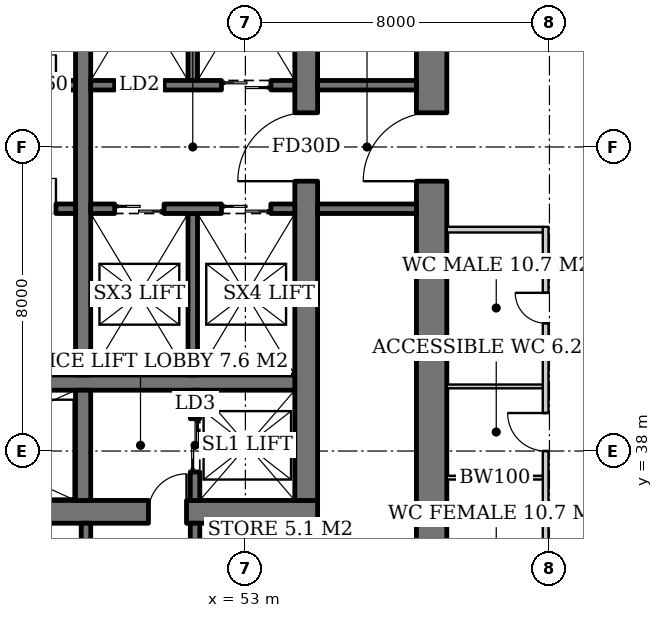
"""IFC4 building model, lengths in metres.
Left out: names, types, materials, properties, quantities, classifications, styles, units other than length and angle.
Written with IfcOpenShell. Run it as: python <this file> out.ifc"""

import sys

from ifc_helpers import new_model, si_unit, direction, frame, frame_2d, origin, place, context, subcontext, project, spatial, rectangle, extrude, element, fill, save


model = new_model("IFC4")
c1 = context("Model", 3, precision=1e-05, world=origin(), true_north=direction((0.0, 1.0)))
c2 = subcontext(c1, "Body", "Model", "MODEL_VIEW")
j1 = project(units=[si_unit("LENGTHUNIT", "METRE"), si_unit("PLANEANGLEUNIT", "RADIAN")], contexts=[c1])
p1 = place(None, origin())
s1 = spatial("IfcSite", under=j1, at=p1, CompositionType="ELEMENT")
p2 = place(p1, origin())
s2 = spatial("IfcBuilding", under=s1, at=p2, CompositionType="ELEMENT")
p3 = place(p2, origin())
s3 = spatial("IfcBuildingStorey", under=s2, at=p3, CompositionType="ELEMENT", Elevation=0.0)
p4 = place(p3, frame((35.1, 36.4, 0.0), z_axis=(0.0, 0.0, 1.0), x_axis=(1.0, 0.0, 0.0)))
e1 = element("IfcWall", 1, at=p4, inside=s3, PredefinedType="SHEAR", context=c2, shape_type="SweptSolid", body=[
    extrude(rectangle(XDim=19.8, YDim=0.6, at=frame_2d((9.9, 0.0))), origin(), (0.0, 0.0, 1.0), 6.0),
])
p5 = place(p4, frame((3.9, 0.0, 0.0)))
e2 = element("IfcOpeningElement", 2, at=p5, cuts=e1, PredefinedType="OPENING", context=c2, shape_type="SweptSolid", body=[
    extrude(rectangle(XDim=1.0, YDim=2.1, at=frame_2d((0.5, 1.05))), frame((0.0, 0.31, 0.0), z_axis=(0.0, -1.0, 0.0), x_axis=(1.0, 0.0, 0.0)), (0.0, 0.0, 1.0), 0.62),
])
p6 = place(p4, frame((15.35, 0.0, 0.0)))
e3 = element("IfcOpeningElement", 3, at=p6, cuts=e1, PredefinedType="OPENING", context=c2, shape_type="SweptSolid", body=[
    extrude(rectangle(XDim=1.0, YDim=2.1, at=frame_2d((0.5, 1.05))), frame((0.0, 0.31, 0.0), z_axis=(0.0, -1.0, 0.0), x_axis=(1.0, 0.0, 0.0)), (0.0, 0.0, 1.0), 0.62),
])
p7 = place(p3, frame((54.6, 36.7, 0.0), z_axis=(0.0, 0.0, 1.0), x_axis=(0.0, 1.0, 0.0)))
e4 = element("IfcWall", 4, at=p7, inside=s3, PredefinedType="SHEAR", context=c2, shape_type="SweptSolid", body=[
    extrude(rectangle(XDim=18.6, YDim=0.6, at=frame_2d((9.3, 0.0))), origin(), (0.0, 0.0, 1.0), 6.0),
])
p8 = place(p7, frame((8.4, 0.0, 0.0)))
e5 = element("IfcOpeningElement", 5, at=p8, cuts=e4, PredefinedType="OPENING", context=c2, shape_type="SweptSolid", body=[
    extrude(rectangle(XDim=1.8, YDim=2.4, at=frame_2d((0.9, 1.2))), frame((0.0, 0.31, 0.0), z_axis=(0.0, -1.0, 0.0), x_axis=(1.0, 0.0, 0.0)), (0.0, 0.0, 1.0), 0.62),
])
p9 = place(p3, frame((57.9, 33.5, 0.0), z_axis=(0.0, 0.0, 1.0), x_axis=(0.0, 1.0, 0.0)))
e6 = element("IfcWall", 6, at=p9, inside=s3, PredefinedType="SHEAR", context=c2, shape_type="SweptSolid", body=[
    extrude(rectangle(XDim=25.0, YDim=0.8, at=frame_2d((12.5, 0.0))), origin(), (0.0, 0.0, 1.0), 6.0),
])
p10 = place(p9, frame((11.6, 0.0, 0.0)))
e7 = element("IfcOpeningElement", 7, at=p10, cuts=e6, PredefinedType="OPENING", context=c2, shape_type="SweptSolid", body=[
    extrude(rectangle(XDim=1.8, YDim=2.4, at=frame_2d((0.9, 1.2))), frame((0.0, 0.41, 0.0), z_axis=(0.0, -1.0, 0.0), x_axis=(1.0, 0.0, 0.0)), (0.0, 0.0, 1.0), 0.82),
])
p11 = place(p3, frame((35.7, 39.8, 0.0), z_axis=(0.0, 0.0, 1.0), x_axis=(1.0, 0.0, 0.0)))
e8 = element("IfcWall", 8, at=p11, inside=s3, PredefinedType="SHEAR", context=c2, shape_type="SweptSolid", body=[
    extrude(rectangle(XDim=18.6, YDim=0.4, at=frame_2d((9.3, 0.0))), origin(), (0.0, 0.0, 1.0), 6.0),
])
p12 = place(p3, frame((48.73, 36.7, 0.0), z_axis=(0.0, 0.0, 1.0), x_axis=(0.0, 1.0, 0.0)))
e9 = element("IfcWall", 9, at=p12, inside=s3, PredefinedType="SHEAR", context=c2, shape_type="SweptSolid", body=[
    extrude(rectangle(XDim=2.9, YDim=0.4, at=frame_2d((1.45, 0.0))), origin(), (0.0, 0.0, 1.0), 6.0),
])
p13 = place(p3, frame((48.73, 40.0, 0.0), z_axis=(0.0, 0.0, 1.0), x_axis=(0.0, 1.0, 0.0)))
e10 = element("IfcWall", 10, at=p13, inside=s3, PredefinedType="SHEAR", context=c2, shape_type="SweptSolid", body=[
    extrude(rectangle(XDim=12.0, YDim=0.4, at=frame_2d((6.0, 0.0))), origin(), (0.0, 0.0, 1.0), 6.0),
])
p14 = place(p3, frame((51.675, 36.7, 0.0), z_axis=(0.0, 0.0, 1.0), x_axis=(0.0, 1.0, 0.0)))
e11 = element("IfcWall", 11, at=p14, inside=s3, PredefinedType="SHEAR", context=c2, shape_type="SweptSolid", body=[
    extrude(rectangle(XDim=2.9, YDim=0.25, at=frame_2d((1.45, 0.0))), origin(), (0.0, 0.0, 1.0), 6.0),
])
p15 = place(p14, frame((0.75, 0.0, 0.0)))
e12 = element("IfcOpeningElement", 12, at=p15, cuts=e11, PredefinedType="OPENING", context=c2, shape_type="SweptSolid", body=[
    extrude(rectangle(XDim=1.4, YDim=2.4, at=frame_2d((0.7, 1.2))), frame((0.0, 0.135, 0.0), z_axis=(0.0, -1.0, 0.0), x_axis=(1.0, 0.0, 0.0)), (0.0, 0.0, 1.0), 0.27),
])
p16 = place(p3, frame((35.7, 47.625, 0.0), z_axis=(0.0, 0.0, 1.0), x_axis=(1.0, 0.0, 0.0)))
e13 = element("IfcWall", 13, at=p16, inside=s3, PredefinedType="SHEAR", context=c2, shape_type="SweptSolid", body=[
    extrude(rectangle(XDim=12.83, YDim=0.25, at=frame_2d((6.415, 0.0))), origin(), (0.0, 0.0, 1.0), 6.0),
])
p17 = place(p16, frame((0.7, 0.0, 0.0)))
e14 = element("IfcOpeningElement", 14, at=p17, cuts=e13, PredefinedType="OPENING", context=c2, shape_type="SweptSolid", body=[
    extrude(rectangle(XDim=1.1, YDim=2.2, at=frame_2d((0.55, 1.1))), frame((0.0, 0.135, 0.0), z_axis=(0.0, -1.0, 0.0), x_axis=(1.0, 0.0, 0.0)), (0.0, 0.0, 1.0), 0.27),
])
p18 = place(p16, frame((3.45, 0.0, 0.0)))
e15 = element("IfcOpeningElement", 15, at=p18, cuts=e13, PredefinedType="OPENING", context=c2, shape_type="SweptSolid", body=[
    extrude(rectangle(XDim=1.1, YDim=2.2, at=frame_2d((0.55, 1.1))), frame((0.0, 0.135, 0.0), z_axis=(0.0, -1.0, 0.0), x_axis=(1.0, 0.0, 0.0)), (0.0, 0.0, 1.0), 0.27),
])
p19 = place(p16, frame((6.2, 0.0, 0.0)))
e16 = element("IfcOpeningElement", 16, at=p19, cuts=e13, PredefinedType="OPENING", context=c2, shape_type="SweptSolid", body=[
    extrude(rectangle(XDim=1.1, YDim=2.2, at=frame_2d((0.55, 1.1))), frame((0.0, 0.135, 0.0), z_axis=(0.0, -1.0, 0.0), x_axis=(1.0, 0.0, 0.0)), (0.0, 0.0, 1.0), 0.27),
])
p20 = place(p16, frame((8.95, 0.0, 0.0)))
e17 = element("IfcOpeningElement", 17, at=p20, cuts=e13, PredefinedType="OPENING", context=c2, shape_type="SweptSolid", body=[
    extrude(rectangle(XDim=1.1, YDim=2.2, at=frame_2d((0.55, 1.1))), frame((0.0, 0.135, 0.0), z_axis=(0.0, -1.0, 0.0), x_axis=(1.0, 0.0, 0.0)), (0.0, 0.0, 1.0), 0.27),
])
p21 = place(p16, frame((11.515, 0.0, 0.0)))
e18 = element("IfcOpeningElement", 18, at=p21, cuts=e13, PredefinedType="OPENING", context=c2, shape_type="SweptSolid", body=[
    extrude(rectangle(XDim=0.8, YDim=2.0, at=frame_2d((0.4, 1.0))), frame((0.0, 0.135, 0.0), z_axis=(0.0, -1.0, 0.0), x_axis=(1.0, 0.0, 0.0)), (0.0, 0.0, 1.0), 0.27),
])
p22 = place(p3, frame((35.7, 44.375, 0.0), z_axis=(0.0, 0.0, 1.0), x_axis=(1.0, 0.0, 0.0)))
e19 = element("IfcWall", 19, at=p22, inside=s3, PredefinedType="SHEAR", context=c2, shape_type="SweptSolid", body=[
    extrude(rectangle(XDim=12.83, YDim=0.25, at=frame_2d((6.415, 0.0))), origin(), (0.0, 0.0, 1.0), 6.0),
])
p23 = place(p22, frame((0.7, 0.0, 0.0)))
e20 = element("IfcOpeningElement", 20, at=p23, cuts=e19, PredefinedType="OPENING", context=c2, shape_type="SweptSolid", body=[
    extrude(rectangle(XDim=1.1, YDim=2.2, at=frame_2d((0.55, 1.1))), frame((0.0, 0.135, 0.0), z_axis=(0.0, -1.0, 0.0), x_axis=(1.0, 0.0, 0.0)), (0.0, 0.0, 1.0), 0.27),
])
p24 = place(p22, frame((3.45, 0.0, 0.0)))
e21 = element("IfcOpeningElement", 21, at=p24, cuts=e19, PredefinedType="OPENING", context=c2, shape_type="SweptSolid", body=[
    extrude(rectangle(XDim=1.1, YDim=2.2, at=frame_2d((0.55, 1.1))), frame((0.0, 0.135, 0.0), z_axis=(0.0, -1.0, 0.0), x_axis=(1.0, 0.0, 0.0)), (0.0, 0.0, 1.0), 0.27),
])
p25 = place(p22, frame((6.2, 0.0, 0.0)))
e22 = element("IfcOpeningElement", 22, at=p25, cuts=e19, PredefinedType="OPENING", context=c2, shape_type="SweptSolid", body=[
    extrude(rectangle(XDim=1.1, YDim=2.2, at=frame_2d((0.55, 1.1))), frame((0.0, 0.135, 0.0), z_axis=(0.0, -1.0, 0.0), x_axis=(1.0, 0.0, 0.0)), (0.0, 0.0, 1.0), 0.27),
])
p26 = place(p22, frame((8.95, 0.0, 0.0)))
e23 = element("IfcOpeningElement", 23, at=p26, cuts=e19, PredefinedType="OPENING", context=c2, shape_type="SweptSolid", body=[
    extrude(rectangle(XDim=1.1, YDim=2.2, at=frame_2d((0.55, 1.1))), frame((0.0, 0.135, 0.0), z_axis=(0.0, -1.0, 0.0), x_axis=(1.0, 0.0, 0.0)), (0.0, 0.0, 1.0), 0.27),
])
p27 = place(p22, frame((11.515, 0.0, 0.0)))
e24 = element("IfcOpeningElement", 24, at=p27, cuts=e19, PredefinedType="OPENING", context=c2, shape_type="SweptSolid", body=[
    extrude(rectangle(XDim=0.8, YDim=2.0, at=frame_2d((0.4, 1.0))), frame((0.0, 0.135, 0.0), z_axis=(0.0, -1.0, 0.0), x_axis=(1.0, 0.0, 0.0)), (0.0, 0.0, 1.0), 0.27),
])
p28 = place(p3, frame((51.615, 47.75, 0.0), z_axis=(0.0, 0.0, 1.0), x_axis=(0.0, 1.0, 0.0)))
e25 = element("IfcWall", 25, at=p28, inside=s3, PredefinedType="SHEAR", context=c2, shape_type="SweptSolid", body=[
    extrude(rectangle(XDim=4.25, YDim=0.25, at=frame_2d((2.125, 0.0))), origin(), (0.0, 0.0, 1.0), 6.0),
])
p29 = place(p3, frame((48.93, 47.625, 0.0), z_axis=(0.0, 0.0, 1.0), x_axis=(1.0, 0.0, 0.0)))
e26 = element("IfcWall", 26, at=p29, inside=s3, PredefinedType="SHEAR", context=c2, shape_type="SweptSolid", body=[
    extrude(rectangle(XDim=5.37, YDim=0.25, at=frame_2d((2.685, 0.0))), origin(), (0.0, 0.0, 1.0), 6.0),
])
p30 = place(p29, frame((0.63, 0.0, 0.0)))
e27 = element("IfcOpeningElement", 27, at=p30, cuts=e26, PredefinedType="OPENING", context=c2, shape_type="SweptSolid", body=[
    extrude(rectangle(XDim=1.3, YDim=2.2, at=frame_2d((0.65, 1.1))), frame((0.0, 0.135, 0.0), z_axis=(0.0, -1.0, 0.0), x_axis=(1.0, 0.0, 0.0)), (0.0, 0.0, 1.0), 0.27),
])
p31 = place(p29, frame((3.44, 0.0, 0.0)))
e28 = element("IfcOpeningElement", 28, at=p31, cuts=e26, PredefinedType="OPENING", context=c2, shape_type="SweptSolid", body=[
    extrude(rectangle(XDim=1.3, YDim=2.2, at=frame_2d((0.65, 1.1))), frame((0.0, 0.135, 0.0), z_axis=(0.0, -1.0, 0.0), x_axis=(1.0, 0.0, 0.0)), (0.0, 0.0, 1.0), 0.27),
])
p32 = place(p3, frame((51.615, 44.25, 0.0), z_axis=(0.0, 0.0, 1.0), x_axis=(0.0, -1.0, 0.0)))
e29 = element("IfcWall", 29, at=p32, inside=s3, PredefinedType="SHEAR", context=c2, shape_type="SweptSolid", body=[
    extrude(rectangle(XDim=4.25, YDim=0.25, at=frame_2d((2.125, 0.0))), origin(), (0.0, 0.0, 1.0), 6.0),
])
p33 = place(p3, frame((48.93, 44.375, 0.0), z_axis=(0.0, 0.0, 1.0), x_axis=(1.0, 0.0, 0.0)))
e30 = element("IfcWall", 30, at=p33, inside=s3, PredefinedType="SHEAR", context=c2, shape_type="SweptSolid", body=[
    extrude(rectangle(XDim=5.37, YDim=0.25, at=frame_2d((2.685, 0.0))), origin(), (0.0, 0.0, 1.0), 6.0),
])
p34 = place(p33, frame((0.63, 0.0, 0.0)))
e31 = element("IfcOpeningElement", 31, at=p34, cuts=e30, PredefinedType="OPENING", context=c2, shape_type="SweptSolid", body=[
    extrude(rectangle(XDim=1.3, YDim=2.2, at=frame_2d((0.65, 1.1))), frame((0.0, 0.135, 0.0), z_axis=(0.0, -1.0, 0.0), x_axis=(1.0, 0.0, 0.0)), (0.0, 0.0, 1.0), 0.27),
])
p35 = place(p33, frame((3.44, 0.0, 0.0)))
e32 = element("IfcOpeningElement", 32, at=p35, cuts=e30, PredefinedType="OPENING", context=c2, shape_type="SweptSolid", body=[
    extrude(rectangle(XDim=1.3, YDim=2.2, at=frame_2d((0.65, 1.1))), frame((0.0, 0.135, 0.0), z_axis=(0.0, -1.0, 0.0), x_axis=(1.0, 0.0, 0.0)), (0.0, 0.0, 1.0), 0.27),
])
for number, where, z_axis, x_axis in (
    (33, (54.9, 44.375, 0.0), (0.0, 0.0, 1.0), (1.0, 0.0, 0.0)),
    (34, (54.9, 47.625, 0.0), (0.0, 0.0, 1.0), (1.0, 0.0, 0.0)),
    (35, (48.805, 33.5, 0.0), (0.0, 0.0, 1.0), (0.0, 1.0, 0.0)),
    (36, (51.675, 33.5, 0.0), (0.0, 0.0, 1.0), (0.0, 1.0, 0.0)),
):
    element("IfcWall", number, at=place(p3, frame(where, z_axis=z_axis, x_axis=x_axis)), inside=s3, PredefinedType="SOLIDWALL", context=c2, shape_type="SweptSolid", body=[
        extrude(rectangle(XDim=2.6, YDim=0.25, at=frame_2d((1.3, 0.0))), origin(), (0.0, 0.0, 1.0), 5.7),
    ])
p36 = place(p3, frame((53.852, 33.5, 0.0), z_axis=(0.0, 0.0, 1.0), x_axis=(0.0, 1.0, 0.0)))
e37 = element("IfcWall", 37, at=p36, inside=s3, PredefinedType="SOLIDWALL", context=c2, shape_type="SweptSolid", body=[
    extrude(rectangle(XDim=2.6, YDim=0.15, at=frame_2d((1.3, 0.0))), origin(), (0.0, 0.0, 1.0), 5.7),
])
p37 = place(p3, frame((60.9, 33.1, 0.0), z_axis=(0.0, 0.0, 1.0), x_axis=(0.0, 1.0, 0.0)))
e38 = element("IfcWall", 38, at=p37, inside=s3, PredefinedType="PARTITIONING", context=c2, shape_type="SweptSolid", body=[
    extrude(rectangle(XDim=10.8, YDim=0.15, at=frame_2d((5.4, 0.0))), origin(), (0.0, 0.0, 1.0), 4.688),
])
p38 = place(p37, frame((1.738, 0.0, 0.0)))
e39 = element("IfcOpeningElement", 39, at=p38, cuts=e38, PredefinedType="OPENING", context=c2, shape_type="SweptSolid", body=[
    extrude(rectangle(XDim=0.8, YDim=2.1, at=frame_2d((0.4, 1.05))), frame((0.0, 0.085, 0.0), z_axis=(0.0, -1.0, 0.0), x_axis=(1.0, 0.0, 0.0)), (0.0, 0.0, 1.0), 0.17),
])
p39 = place(p37, frame((4.9, 0.0, 0.0)))
e40 = element("IfcOpeningElement", 40, at=p39, cuts=e38, PredefinedType="OPENING", context=c2, shape_type="SweptSolid", body=[
    extrude(rectangle(XDim=1.0, YDim=2.1, at=frame_2d((0.5, 1.05))), frame((0.0, 0.085, 0.0), z_axis=(0.0, -1.0, 0.0), x_axis=(1.0, 0.0, 0.0)), (0.0, 0.0, 1.0), 0.17),
])
p40 = place(p37, frame((8.262, 0.0, 0.0)))
e41 = element("IfcOpeningElement", 41, at=p40, cuts=e38, PredefinedType="OPENING", context=c2, shape_type="SweptSolid", body=[
    extrude(rectangle(XDim=0.8, YDim=2.1, at=frame_2d((0.4, 1.05))), frame((0.0, 0.085, 0.0), z_axis=(0.0, -1.0, 0.0), x_axis=(1.0, 0.0, 0.0)), (0.0, 0.0, 1.0), 0.17),
])
p41 = place(p3, frame((60.825, 37.3, 0.0), z_axis=(0.0, 0.0, 1.0), x_axis=(-1.0, 0.0, 0.0)))
e42 = element("IfcWall", 42, at=p41, inside=s3, PredefinedType="SOLIDWALL", context=c2, shape_type="SweptSolid", body=[
    extrude(rectangle(XDim=2.525, YDim=0.1, at=frame_2d((1.262, 0.0))), origin(), (0.0, 0.0, 1.0), 4.9),
])
p42 = place(p3, frame((60.825, 39.7, 0.0), z_axis=(0.0, 0.0, 1.0), x_axis=(-1.0, 0.0, 0.0)))
e43 = element("IfcWall", 43, at=p42, inside=s3, PredefinedType="SOLIDWALL", context=c2, shape_type="SweptSolid", body=[
    extrude(rectangle(XDim=2.525, YDim=0.1, at=frame_2d((1.262, 0.0))), origin(), (0.0, 0.0, 1.0), 5.7),
])
p43 = place(p3, frame((60.825, 43.825, 0.0), z_axis=(0.0, 0.0, 1.0), x_axis=(-1.0, 0.0, 0.0)))
e44 = element("IfcWall", 44, at=p43, inside=s3, PredefinedType="PARTITIONING", context=c2, shape_type="SweptSolid", body=[
    extrude(rectangle(XDim=2.525, YDim=0.15, at=frame_2d((1.262, 0.0))), origin(), (0.0, 0.0, 1.0), 5.7),
])
p44 = place(p15, origin())
e45 = element("IfcDoor", 45, at=p44, inside=s3, OperationType="DOUBLE_DOOR_SLIDING", PredefinedType="DOOR", context=c2, shape_type="SweptSolid", body=[
    extrude(rectangle(XDim=1.4, YDim=2.4, at=frame_2d((0.7, 1.2))), frame((0.0, 0.025, 0.0), z_axis=(0.0, -1.0, 0.0), x_axis=(1.0, 0.0, 0.0)), (0.0, 0.0, 1.0), 0.05),
])
fill(e12, e45)
p45 = place(p21, origin())
e46 = element("IfcDoor", 46, at=p45, inside=s3, OperationType="SINGLE_SWING_RIGHT", PredefinedType="DOOR", context=c2, shape_type="SweptSolid", body=[
    extrude(rectangle(XDim=0.8, YDim=2.0, at=frame_2d((0.4, 1.0))), frame((0.0, 0.025, 0.0), z_axis=(0.0, -1.0, 0.0), x_axis=(1.0, 0.0, 0.0)), (0.0, 0.0, 1.0), 0.05),
])
fill(e18, e46)
p46 = place(p27, origin())
e47 = element("IfcDoor", 47, at=p46, inside=s3, OperationType="SINGLE_SWING_RIGHT", PredefinedType="DOOR", context=c2, shape_type="SweptSolid", body=[
    extrude(rectangle(XDim=0.8, YDim=2.0, at=frame_2d((0.4, 1.0))), frame((0.0, 0.025, 0.0), z_axis=(0.0, -1.0, 0.0), x_axis=(1.0, 0.0, 0.0)), (0.0, 0.0, 1.0), 0.05),
])
fill(e24, e47)
p47 = place(p30, origin())
e48 = element("IfcDoor", 48, at=p47, inside=s3, OperationType="DOUBLE_DOOR_SLIDING", PredefinedType="DOOR", context=c2, shape_type="SweptSolid", body=[
    extrude(rectangle(XDim=1.3, YDim=2.2, at=frame_2d((0.65, 1.1))), frame((0.0, 0.025, 0.0), z_axis=(0.0, -1.0, 0.0), x_axis=(1.0, 0.0, 0.0)), (0.0, 0.0, 1.0), 0.05),
])
fill(e27, e48)
p48 = place(p31, origin())
e49 = element("IfcDoor", 49, at=p48, inside=s3, OperationType="DOUBLE_DOOR_SLIDING", PredefinedType="DOOR", context=c2, shape_type="SweptSolid", body=[
    extrude(rectangle(XDim=1.3, YDim=2.2, at=frame_2d((0.65, 1.1))), frame((0.0, 0.025, 0.0), z_axis=(0.0, -1.0, 0.0), x_axis=(1.0, 0.0, 0.0)), (0.0, 0.0, 1.0), 0.05),
])
fill(e28, e49)
p49 = place(p34, origin())
e50 = element("IfcDoor", 50, at=p49, inside=s3, OperationType="DOUBLE_DOOR_SLIDING", PredefinedType="DOOR", context=c2, shape_type="SweptSolid", body=[
    extrude(rectangle(XDim=1.3, YDim=2.2, at=frame_2d((0.65, 1.1))), frame((0.0, 0.025, 0.0), z_axis=(0.0, -1.0, 0.0), x_axis=(1.0, 0.0, 0.0)), (0.0, 0.0, 1.0), 0.05),
])
fill(e31, e50)
p50 = place(p35, origin())
e51 = element("IfcDoor", 51, at=p50, inside=s3, OperationType="DOUBLE_DOOR_SLIDING", PredefinedType="DOOR", context=c2, shape_type="SweptSolid", body=[
    extrude(rectangle(XDim=1.3, YDim=2.2, at=frame_2d((0.65, 1.1))), frame((0.0, 0.025, 0.0), z_axis=(0.0, -1.0, 0.0), x_axis=(1.0, 0.0, 0.0)), (0.0, 0.0, 1.0), 0.05),
])
fill(e32, e51)
p51 = place(p8, origin())
e52 = element("IfcDoor", 52, at=p51, inside=s3, OperationType="DOUBLE_DOOR_SINGLE_SWING", PredefinedType="DOOR", context=c2, shape_type="SweptSolid", body=[
    extrude(rectangle(XDim=1.8, YDim=2.4, at=frame_2d((0.9, 1.2))), frame((0.0, 0.025, 0.0), z_axis=(0.0, -1.0, 0.0), x_axis=(1.0, 0.0, 0.0)), (0.0, 0.0, 1.0), 0.05),
])
fill(e5, e52)
p52 = place(p6, origin())
e53 = element("IfcDoor", 53, at=p52, inside=s3, OperationType="SINGLE_SWING_RIGHT", PredefinedType="DOOR", context=c2, shape_type="SweptSolid", body=[
    extrude(rectangle(XDim=1.0, YDim=2.1, at=frame_2d((0.5, 1.05))), frame((0.0, 0.025, 0.0), z_axis=(0.0, -1.0, 0.0), x_axis=(1.0, 0.0, 0.0)), (0.0, 0.0, 1.0), 0.05),
])
fill(e3, e53)
p53 = place(p10, origin())
e54 = element("IfcDoor", 54, at=p53, inside=s3, OperationType="DOUBLE_DOOR_SINGLE_SWING", PredefinedType="DOOR", context=c2, shape_type="SweptSolid", body=[
    extrude(rectangle(XDim=1.8, YDim=2.4, at=frame_2d((0.9, 1.2))), frame((0.0, 0.025, 0.0), z_axis=(0.0, -1.0, 0.0), x_axis=(1.0, 0.0, 0.0)), (0.0, 0.0, 1.0), 0.05),
])
fill(e7, e54)
p54 = place(p39, origin())
e55 = element("IfcDoor", 55, at=p54, inside=s3, OperationType="SINGLE_SWING_RIGHT", PredefinedType="DOOR", context=c2, shape_type="SweptSolid", body=[
    extrude(rectangle(XDim=1.0, YDim=2.1, at=frame_2d((0.5, 1.05))), frame((0.0, 0.025, 0.0), z_axis=(0.0, -1.0, 0.0), x_axis=(1.0, 0.0, 0.0)), (0.0, 0.0, 1.0), 0.05),
])
fill(e40, e55)
p55 = place(p40, origin())
e56 = element("IfcDoor", 56, at=p55, inside=s3, OperationType="SINGLE_SWING_RIGHT", PredefinedType="DOOR", context=c2, shape_type="SweptSolid", body=[
    extrude(rectangle(XDim=0.8, YDim=2.1, at=frame_2d((0.4, 1.05))), frame((0.0, 0.025, 0.0), z_axis=(0.0, -1.0, 0.0), x_axis=(1.0, 0.0, 0.0)), (0.0, 0.0, 1.0), 0.05),
])
fill(e41, e56)
save(model, sys.argv[1])
